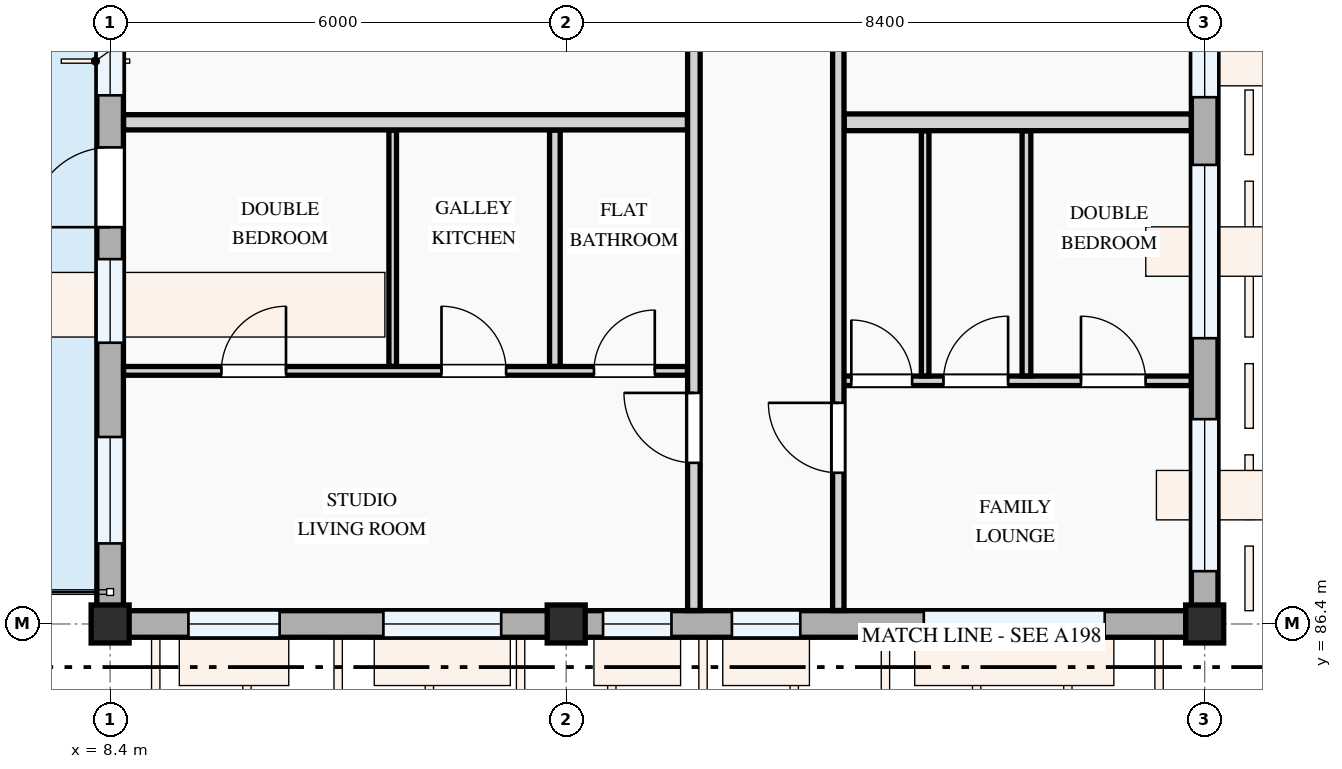
"""IFC4 building model, lengths in metres.
Left out: names, types, materials, properties, quantities, classifications, styles, units other than length and angle.
Written with IfcOpenShell. Run it as: python <this file> out.ifc"""

import sys

from ifc_helpers import new_model, si_unit, direction, frame, frame_2d, origin, origin_2d, place, context, subcontext, project, spatial, rectangle, extrude, element, fill, save


model = new_model("IFC4")
c1 = context("Model", 3, precision=1e-05, world=origin(), true_north=direction((0.0, 1.0)))
c2 = subcontext(c1, "Body", "Model", "MODEL_VIEW")
j1 = project(units=[si_unit("LENGTHUNIT", "METRE"), si_unit("PLANEANGLEUNIT", "RADIAN")], contexts=[c1])
p1 = place(None, origin())
s1 = spatial("IfcSite", under=j1, at=p1, CompositionType="ELEMENT")
p2 = place(p1, origin())
s2 = spatial("IfcBuilding", under=s1, at=p2, CompositionType="ELEMENT")
p3 = place(p2, frame((0.0, 0.0, 47.7)))
s3 = spatial("IfcBuildingStorey", under=s2, at=p3, CompositionType="ELEMENT", Elevation=47.7)
for number, where, z_axis, x_axis in (
    (1, (8.4, 86.4, 0.0), (0.0, 0.0, 1.0), (1.0, 0.0, 0.0)),
    (2, (14.4, 86.4, 0.0), (0.0, 0.0, 1.0), (1.0, 0.0, 0.0)),
    (3, (22.8, 86.4, 0.0), (0.0, 0.0, 1.0), (1.0, 0.0, 0.0)),
):
    element("IfcColumn", number, at=place(p3, frame(where, z_axis=z_axis, x_axis=x_axis)), inside=s3, PredefinedType="COLUMN", context=c2, shape_type="SweptSolid", body=[
        extrude(rectangle(XDim=0.5, YDim=0.5, at=origin_2d()), origin(), (0.0, 0.0, 1.0), 3.3),
    ])
p4 = place(p3, frame((8.4, 94.8, 0.0), z_axis=(0.0, 0.0, 1.0), x_axis=(0.0, -1.0, 0.0)))
e4 = element("IfcWall", 4, at=p4, inside=s3, PredefinedType="STANDARD", context=c2, shape_type="SweptSolid", body=[
    extrude(rectangle(XDim=8.4, YDim=0.35, at=frame_2d((4.2, 0.0))), origin(), (0.0, 0.0, 1.0), 2.425),
])
p5 = place(p4, frame((2.13, 0.0, 0.0)))
e5 = element("IfcOpeningElement", 5, at=p5, cuts=e4, PredefinedType="OPENING", context=c2, shape_type="SweptSolid", body=[
    extrude(rectangle(XDim=1.05, YDim=2.15, at=frame_2d((0.525, 1.075))), frame((0.0, 0.185, 0.0), z_axis=(0.0, -1.0, 0.0), x_axis=(1.0, 0.0, 0.0)), (0.0, 0.0, 1.0), 0.37),
])
p6 = place(p4, frame((0.545, 0.0, 0.78)))
e6 = element("IfcOpeningElement", 6, at=p6, cuts=e4, PredefinedType="OPENING", context=c2, shape_type="SweptSolid", body=[
    extrude(rectangle(XDim=0.9, YDim=1.2, at=frame_2d((0.45, 0.6))), frame((0.0, 0.185, 0.0), z_axis=(0.0, -1.0, 0.0), x_axis=(1.0, 0.0, 0.0)), (0.0, 0.0, 1.0), 0.37),
])
p7 = place(p4, frame((3.6, 0.0, 0.78)))
e7 = element("IfcOpeningElement", 7, at=p7, cuts=e4, PredefinedType="OPENING", context=c2, shape_type="SweptSolid", body=[
    extrude(rectangle(XDim=1.1, YDim=1.3, at=frame_2d((0.55, 0.65))), frame((0.0, 0.185, 0.0), z_axis=(0.0, -1.0, 0.0), x_axis=(1.0, 0.0, 0.0)), (0.0, 0.0, 1.0), 0.37),
])
p8 = place(p4, frame((5.94, 0.0, 0.78)))
e8 = element("IfcOpeningElement", 8, at=p8, cuts=e4, PredefinedType="OPENING", context=c2, shape_type="SweptSolid", body=[
    extrude(rectangle(XDim=1.4, YDim=1.45, at=frame_2d((0.7, 0.725))), frame((0.0, 0.185, 0.0), z_axis=(0.0, -1.0, 0.0), x_axis=(1.0, 0.0, 0.0)), (0.0, 0.0, 1.0), 0.37),
])
p9 = place(p3, frame((8.4, 86.4, 0.0), z_axis=(0.0, 0.0, 1.0), x_axis=(1.0, 0.0, 0.0)))
e9 = element("IfcWall", 9, at=p9, inside=s3, PredefinedType="STANDARD", context=c2, shape_type="SweptSolid", body=[
    extrude(rectangle(XDim=6.0, YDim=0.35, at=frame_2d((3.0, 0.0))), origin(), (0.0, 0.0, 1.0), 2.525),
])
p10 = place(p9, frame((1.03, 0.0, 0.78)))
e10 = element("IfcOpeningElement", 10, at=p10, cuts=e9, PredefinedType="OPENING", context=c2, shape_type="SweptSolid", body=[
    extrude(rectangle(XDim=1.2, YDim=1.35, at=frame_2d((0.6, 0.675))), frame((0.0, 0.185, 0.0), z_axis=(0.0, -1.0, 0.0), x_axis=(1.0, 0.0, 0.0)), (0.0, 0.0, 1.0), 0.37),
])
p11 = place(p9, frame((3.595, 0.0, 0.78)))
e11 = element("IfcOpeningElement", 11, at=p11, cuts=e9, PredefinedType="OPENING", context=c2, shape_type="SweptSolid", body=[
    extrude(rectangle(XDim=1.55, YDim=1.4, at=frame_2d((0.775, 0.7))), frame((0.0, 0.185, 0.0), z_axis=(0.0, -1.0, 0.0), x_axis=(1.0, 0.0, 0.0)), (0.0, 0.0, 1.0), 0.37),
])
p12 = place(p3, frame((14.4, 86.4, 0.0), z_axis=(0.0, 0.0, 1.0), x_axis=(1.0, 0.0, 0.0)))
e12 = element("IfcWall", 12, at=p12, inside=s3, PredefinedType="STANDARD", context=c2, shape_type="SweptSolid", body=[
    extrude(rectangle(XDim=8.4, YDim=0.35, at=frame_2d((4.2, 0.0))), origin(), (0.0, 0.0, 1.0), 2.375),
])
p13 = place(p12, frame((0.485, 0.0, 0.78)))
e13 = element("IfcOpeningElement", 13, at=p13, cuts=e12, PredefinedType="OPENING", context=c2, shape_type="SweptSolid", body=[
    extrude(rectangle(XDim=0.9, YDim=1.2, at=frame_2d((0.45, 0.6))), frame((0.0, 0.185, 0.0), z_axis=(0.0, -1.0, 0.0), x_axis=(1.0, 0.0, 0.0)), (0.0, 0.0, 1.0), 0.37),
])
p14 = place(p12, frame((2.18, 0.0, 0.78)))
e14 = element("IfcOpeningElement", 14, at=p14, cuts=e12, PredefinedType="OPENING", context=c2, shape_type="SweptSolid", body=[
    extrude(rectangle(XDim=0.9, YDim=1.2, at=frame_2d((0.45, 0.6))), frame((0.0, 0.185, 0.0), z_axis=(0.0, -1.0, 0.0), x_axis=(1.0, 0.0, 0.0)), (0.0, 0.0, 1.0), 0.37),
])
p15 = place(p12, frame((4.705, 0.0, 0.78)))
e15 = element("IfcOpeningElement", 15, at=p15, cuts=e12, PredefinedType="OPENING", context=c2, shape_type="SweptSolid", body=[
    extrude(rectangle(XDim=2.38, YDim=1.48, at=frame_2d((1.19, 0.74))), frame((0.0, 0.185, 0.0), z_axis=(0.0, -1.0, 0.0), x_axis=(1.0, 0.0, 0.0)), (0.0, 0.0, 1.0), 0.37),
])
p16 = place(p3, frame((22.8, 86.4, 0.0), z_axis=(0.0, 0.0, 1.0), x_axis=(0.0, 1.0, 0.0)))
e16 = element("IfcWall", 16, at=p16, inside=s3, PredefinedType="STANDARD", context=c2, shape_type="SweptSolid", body=[
    extrude(rectangle(XDim=8.4, YDim=0.35, at=frame_2d((4.2, 0.0))), origin(), (0.0, 0.0, 1.0), 2.425),
])
p17 = place(p16, frame((0.695, 0.0, 0.78)))
e17 = element("IfcOpeningElement", 17, at=p17, cuts=e16, PredefinedType="OPENING", context=c2, shape_type="SweptSolid", body=[
    extrude(rectangle(XDim=2.0, YDim=1.5, at=frame_2d((1.0, 0.75))), frame((0.0, 0.185, 0.0), z_axis=(0.0, -1.0, 0.0), x_axis=(1.0, 0.0, 0.0)), (0.0, 0.0, 1.0), 0.37),
])
p18 = place(p16, frame((3.76, 0.0, 0.78)))
e18 = element("IfcOpeningElement", 18, at=p18, cuts=e16, PredefinedType="OPENING", context=c2, shape_type="SweptSolid", body=[
    extrude(rectangle(XDim=2.28, YDim=1.46, at=frame_2d((1.14, 0.73))), frame((0.0, 0.185, 0.0), z_axis=(0.0, -1.0, 0.0), x_axis=(1.0, 0.0, 0.0)), (0.0, 0.0, 1.0), 0.37),
])
p19 = place(p16, frame((6.93, 0.0, 0.78)))
e19 = element("IfcOpeningElement", 19, at=p19, cuts=e16, PredefinedType="OPENING", context=c2, shape_type="SweptSolid", body=[
    extrude(rectangle(XDim=0.95, YDim=1.15, at=frame_2d((0.475, 0.575))), frame((0.0, 0.185, 0.0), z_axis=(0.0, -1.0, 0.0), x_axis=(1.0, 0.0, 0.0)), (0.0, 0.0, 1.0), 0.37),
])
p20 = place(p3, frame((8.577, 89.73, 0.0), z_axis=(0.0, 0.0, 1.0), x_axis=(1.0, 0.0, 0.0)))
e20 = element("IfcWall", 20, at=p20, inside=s3, PredefinedType="PARTITIONING", context=c2, shape_type="SweptSolid", body=[
    extrude(rectangle(XDim=7.419, YDim=0.115, at=frame_2d((3.709, 0.0))), origin(), (0.0, 0.0, 1.0), 3.0),
])
p21 = place(p20, frame((1.287, 0.0, 0.0)))
e21 = element("IfcOpeningElement", 21, at=p21, cuts=e20, PredefinedType="OPENING", context=c2, shape_type="SweptSolid", body=[
    extrude(rectangle(XDim=0.85, YDim=2.1, at=frame_2d((0.425, 1.05))), frame((0.0, 0.067, 0.0), z_axis=(0.0, -1.0, 0.0), x_axis=(1.0, 0.0, 0.0)), (0.0, 0.0, 1.0), 0.135),
])
p22 = place(p20, frame((4.182, 0.0, 0.0)))
e22 = element("IfcOpeningElement", 22, at=p22, cuts=e20, PredefinedType="OPENING", context=c2, shape_type="SweptSolid", body=[
    extrude(rectangle(XDim=0.85, YDim=2.1, at=frame_2d((0.425, 1.05))), frame((0.0, 0.067, 0.0), z_axis=(0.0, -1.0, 0.0), x_axis=(1.0, 0.0, 0.0)), (0.0, 0.0, 1.0), 0.135),
])
p23 = place(p20, frame((6.189, 0.0, 0.0)))
e23 = element("IfcOpeningElement", 23, at=p23, cuts=e20, PredefinedType="OPENING", context=c2, shape_type="SweptSolid", body=[
    extrude(rectangle(XDim=0.8, YDim=2.1, at=frame_2d((0.4, 1.05))), frame((0.0, 0.067, 0.0), z_axis=(0.0, -1.0, 0.0), x_axis=(1.0, 0.0, 0.0)), (0.0, 0.0, 1.0), 0.135),
])
p24 = place(p3, frame((12.118, 89.79, 0.0), z_axis=(0.0, 0.0, 1.0), x_axis=(0.0, 1.0, 0.0)))
e24 = element("IfcWall", 24, at=p24, inside=s3, PredefinedType="PARTITIONING", context=c2, shape_type="SweptSolid", body=[
    extrude(rectangle(XDim=3.108, YDim=0.1, at=frame_2d((1.554, 0.0))), origin(), (0.0, 0.0, 1.0), 3.0),
])
p25 = place(p3, frame((14.251, 89.79, 0.0), z_axis=(0.0, 0.0, 1.0), x_axis=(0.0, 1.0, 0.0)))
e25 = element("IfcWall", 25, at=p25, inside=s3, PredefinedType="PARTITIONING", context=c2, shape_type="SweptSolid", body=[
    extrude(rectangle(XDim=3.108, YDim=0.14, at=frame_2d((1.554, 0.0))), origin(), (0.0, 0.0, 1.0), 2.425),
])
p26 = place(p3, frame((17.98, 89.599, 0.0), z_axis=(0.0, 0.0, 1.0), x_axis=(1.0, 0.0, 0.0)))
e26 = element("IfcWall", 26, at=p26, inside=s3, PredefinedType="PARTITIONING", context=c2, shape_type="SweptSolid", body=[
    extrude(rectangle(XDim=4.643, YDim=0.125, at=frame_2d((2.322, 0.0))), origin(), (0.0, 0.0, 1.0), 3.0),
])
p27 = place(p26, frame((0.171, 0.0, 0.0)))
e27 = element("IfcOpeningElement", 27, at=p27, cuts=e26, PredefinedType="OPENING", context=c2, shape_type="SweptSolid", body=[
    extrude(rectangle(XDim=0.8, YDim=2.1, at=frame_2d((0.4, 1.05))), frame((0.0, 0.073, 0.0), z_axis=(0.0, -1.0, 0.0), x_axis=(1.0, 0.0, 0.0)), (0.0, 0.0, 1.0), 0.145),
])
p28 = place(p26, frame((1.384, 0.0, 0.0)))
e28 = element("IfcOpeningElement", 28, at=p28, cuts=e26, PredefinedType="OPENING", context=c2, shape_type="SweptSolid", body=[
    extrude(rectangle(XDim=0.85, YDim=2.1, at=frame_2d((0.425, 1.05))), frame((0.0, 0.073, 0.0), z_axis=(0.0, -1.0, 0.0), x_axis=(1.0, 0.0, 0.0)), (0.0, 0.0, 1.0), 0.145),
])
p29 = place(p26, frame((3.193, 0.0, 0.0)))
e29 = element("IfcOpeningElement", 29, at=p29, cuts=e26, PredefinedType="OPENING", context=c2, shape_type="SweptSolid", body=[
    extrude(rectangle(XDim=0.85, YDim=2.1, at=frame_2d((0.425, 1.05))), frame((0.0, 0.073, 0.0), z_axis=(0.0, -1.0, 0.0), x_axis=(1.0, 0.0, 0.0)), (0.0, 0.0, 1.0), 0.145),
])
p30 = place(p3, frame((20.455, 89.664, 0.0), z_axis=(0.0, 0.0, 1.0), x_axis=(0.0, 1.0, 0.0)))
e30 = element("IfcWall", 30, at=p30, inside=s3, PredefinedType="PARTITIONING", context=c2, shape_type="SweptSolid", body=[
    extrude(rectangle(XDim=3.224, YDim=0.115, at=frame_2d((1.612, 0.0))), origin(), (0.0, 0.0, 1.0), 3.0),
])
p31 = place(p3, frame((19.122, 89.664, 0.0), z_axis=(0.0, 0.0, 1.0), x_axis=(0.0, 1.0, 0.0)))
e31 = element("IfcWall", 31, at=p31, inside=s3, PredefinedType="PARTITIONING", context=c2, shape_type="SweptSolid", body=[
    extrude(rectangle(XDim=3.224, YDim=0.1, at=frame_2d((1.612, 0.0))), origin(), (0.0, 0.0, 1.0), 3.0),
])
p32 = place(p3, frame((8.577, 93.0, 0.0), z_axis=(0.0, 0.0, 1.0), x_axis=(1.0, 0.0, 0.0)))
e32 = element("IfcWall", 32, at=p32, inside=s3, PredefinedType="PARTITIONING", context=c2, shape_type="SweptSolid", body=[
    extrude(rectangle(XDim=7.419, YDim=0.2, at=frame_2d((3.709, 0.0))), origin(), (0.0, 0.0, 1.0), 3.0),
])
p33 = place(p3, frame((18.057, 93.0, 0.0), z_axis=(0.0, 0.0, 1.0), x_axis=(1.0, 0.0, 0.0)))
e33 = element("IfcWall", 33, at=p33, inside=s3, PredefinedType="PARTITIONING", context=c2, shape_type="SweptSolid", body=[
    extrude(rectangle(XDim=4.566, YDim=0.22, at=frame_2d((2.283, 0.0))), origin(), (0.0, 0.0, 1.0), 3.0),
])
p34 = place(p3, frame((16.08, 86.577, 0.0), z_axis=(0.0, 0.0, 1.0), x_axis=(0.0, 1.0, 0.0)))
e34 = element("IfcWall", 34, at=p34, inside=s3, PredefinedType="PARTITIONING", context=c2, shape_type="SweptSolid", body=[
    extrude(rectangle(XDim=22.763, YDim=0.165, at=frame_2d((11.382, 0.0))), origin(), (0.0, 0.0, 1.0), 3.0),
])
p35 = place(p34, frame((1.943, 0.0, 0.0)))
e35 = element("IfcOpeningElement", 35, at=p35, cuts=e34, PredefinedType="OPENING", context=c2, shape_type="SweptSolid", body=[
    extrude(rectangle(XDim=0.92, YDim=2.1, at=frame_2d((0.46, 1.05))), frame((0.0, 0.093, 0.0), z_axis=(0.0, -1.0, 0.0), x_axis=(1.0, 0.0, 0.0)), (0.0, 0.0, 1.0), 0.185),
])
p36 = place(p34, frame((10.728, 0.0, 0.0)))
e36 = element("IfcOpeningElement", 36, at=p36, cuts=e34, PredefinedType="OPENING", context=c2, shape_type="SweptSolid", body=[
    extrude(rectangle(XDim=0.96, YDim=2.12, at=frame_2d((0.48, 1.06))), frame((0.0, 0.093, 0.0), z_axis=(0.0, -1.0, 0.0), x_axis=(1.0, 0.0, 0.0)), (0.0, 0.0, 1.0), 0.185),
])
p37 = place(p3, frame((17.98, 86.577, 0.0), z_axis=(0.0, 0.0, 1.0), x_axis=(0.0, 1.0, 0.0)))
e37 = element("IfcWall", 37, at=p37, inside=s3, PredefinedType="PARTITIONING", context=c2, shape_type="SweptSolid", body=[
    extrude(rectangle(XDim=22.763, YDim=0.15, at=frame_2d((11.382, 0.0))), origin(), (0.0, 0.0, 1.0), 3.0),
])
p38 = place(p37, frame((1.812, 0.0, 0.0)))
e38 = element("IfcOpeningElement", 38, at=p38, cuts=e37, PredefinedType="OPENING", context=c2, shape_type="SweptSolid", body=[
    extrude(rectangle(XDim=0.92, YDim=2.1, at=frame_2d((0.46, 1.05))), frame((0.0, 0.085, 0.0), z_axis=(0.0, -1.0, 0.0), x_axis=(1.0, 0.0, 0.0)), (0.0, 0.0, 1.0), 0.17),
])
p39 = place(p37, frame((10.715, 0.0, 0.0)))
e39 = element("IfcOpeningElement", 39, at=p39, cuts=e37, PredefinedType="OPENING", context=c2, shape_type="SweptSolid", body=[
    extrude(rectangle(XDim=0.92, YDim=2.1, at=frame_2d((0.46, 1.05))), frame((0.0, 0.085, 0.0), z_axis=(0.0, -1.0, 0.0), x_axis=(1.0, 0.0, 0.0)), (0.0, 0.0, 1.0), 0.17),
])
p40 = place(p5, frame((1.05, 0.0, 0.0), z_axis=(0.0, 0.0, 1.0), x_axis=(-1.0, 0.0, 0.0)))
e40 = element("IfcDoor", 40, at=p40, inside=s3, OperationType="SINGLE_SWING_LEFT", PredefinedType="DOOR", context=c2, shape_type="SweptSolid", body=[
    extrude(rectangle(XDim=1.05, YDim=2.15, at=frame_2d((0.525, 1.075))), frame((0.0, 0.025, 0.0), z_axis=(0.0, -1.0, 0.0), x_axis=(1.0, 0.0, 0.0)), (0.0, 0.0, 1.0), 0.05),
])
fill(e5, e40)
p41 = place(p6, origin())
e41 = element("IfcWindow", 41, at=p41, inside=s3, PartitioningType="SINGLE_PANEL", PredefinedType="WINDOW", context=c2, shape_type="SweptSolid", body=[
    extrude(rectangle(XDim=0.9, YDim=1.2, at=frame_2d((0.45, 0.6))), frame((0.0, 0.03, 0.0), z_axis=(0.0, -1.0, 0.0), x_axis=(1.0, 0.0, 0.0)), (0.0, 0.0, 1.0), 0.06),
])
fill(e6, e41)
p42 = place(p7, origin())
e42 = element("IfcWindow", 42, at=p42, inside=s3, PartitioningType="SINGLE_PANEL", PredefinedType="WINDOW", context=c2, shape_type="SweptSolid", body=[
    extrude(rectangle(XDim=1.1, YDim=1.3, at=frame_2d((0.55, 0.65))), frame((0.0, 0.03, 0.0), z_axis=(0.0, -1.0, 0.0), x_axis=(1.0, 0.0, 0.0)), (0.0, 0.0, 1.0), 0.06),
])
fill(e7, e42)
p43 = place(p8, origin())
e43 = element("IfcWindow", 43, at=p43, inside=s3, PartitioningType="SINGLE_PANEL", PredefinedType="WINDOW", context=c2, shape_type="SweptSolid", body=[
    extrude(rectangle(XDim=1.4, YDim=1.45, at=frame_2d((0.7, 0.725))), frame((0.0, 0.03, 0.0), z_axis=(0.0, -1.0, 0.0), x_axis=(1.0, 0.0, 0.0)), (0.0, 0.0, 1.0), 0.06),
])
fill(e8, e43)
p44 = place(p10, origin())
e44 = element("IfcWindow", 44, at=p44, inside=s3, PartitioningType="SINGLE_PANEL", PredefinedType="WINDOW", context=c2, shape_type="SweptSolid", body=[
    extrude(rectangle(XDim=1.2, YDim=1.35, at=frame_2d((0.6, 0.675))), frame((0.0, 0.03, 0.0), z_axis=(0.0, -1.0, 0.0), x_axis=(1.0, 0.0, 0.0)), (0.0, 0.0, 1.0), 0.06),
])
fill(e10, e44)
p45 = place(p11, origin())
e45 = element("IfcWindow", 45, at=p45, inside=s3, PartitioningType="SINGLE_PANEL", PredefinedType="WINDOW", context=c2, shape_type="SweptSolid", body=[
    extrude(rectangle(XDim=1.55, YDim=1.4, at=frame_2d((0.775, 0.7))), frame((0.0, 0.03, 0.0), z_axis=(0.0, -1.0, 0.0), x_axis=(1.0, 0.0, 0.0)), (0.0, 0.0, 1.0), 0.06),
])
fill(e11, e45)
p46 = place(p13, origin())
e46 = element("IfcWindow", 46, at=p46, inside=s3, PartitioningType="SINGLE_PANEL", PredefinedType="WINDOW", context=c2, shape_type="SweptSolid", body=[
    extrude(rectangle(XDim=0.9, YDim=1.2, at=frame_2d((0.45, 0.6))), frame((0.0, 0.03, 0.0), z_axis=(0.0, -1.0, 0.0), x_axis=(1.0, 0.0, 0.0)), (0.0, 0.0, 1.0), 0.06),
])
fill(e13, e46)
p47 = place(p14, origin())
e47 = element("IfcWindow", 47, at=p47, inside=s3, PartitioningType="SINGLE_PANEL", PredefinedType="WINDOW", context=c2, shape_type="SweptSolid", body=[
    extrude(rectangle(XDim=0.9, YDim=1.2, at=frame_2d((0.45, 0.6))), frame((0.0, 0.03, 0.0), z_axis=(0.0, -1.0, 0.0), x_axis=(1.0, 0.0, 0.0)), (0.0, 0.0, 1.0), 0.06),
])
fill(e14, e47)
p48 = place(p15, origin())
e48 = element("IfcWindow", 48, at=p48, inside=s3, PartitioningType="DOUBLE_PANEL_VERTICAL", PredefinedType="WINDOW", context=c2, shape_type="SweptSolid", body=[
    extrude(rectangle(XDim=2.38, YDim=1.48, at=frame_2d((1.19, 0.74))), frame((0.0, 0.03, 0.0), z_axis=(0.0, -1.0, 0.0), x_axis=(1.0, 0.0, 0.0)), (0.0, 0.0, 1.0), 0.06),
])
fill(e15, e48)
p49 = place(p17, origin())
e49 = element("IfcWindow", 49, at=p49, inside=s3, PartitioningType="DOUBLE_PANEL_VERTICAL", PredefinedType="WINDOW", context=c2, shape_type="SweptSolid", body=[
    extrude(rectangle(XDim=2.0, YDim=1.5, at=frame_2d((1.0, 0.75))), frame((0.0, 0.03, 0.0), z_axis=(0.0, -1.0, 0.0), x_axis=(1.0, 0.0, 0.0)), (0.0, 0.0, 1.0), 0.06),
])
fill(e17, e49)
p50 = place(p18, origin())
e50 = element("IfcWindow", 50, at=p50, inside=s3, PartitioningType="DOUBLE_PANEL_VERTICAL", PredefinedType="WINDOW", context=c2, shape_type="SweptSolid", body=[
    extrude(rectangle(XDim=2.28, YDim=1.46, at=frame_2d((1.14, 0.73))), frame((0.0, 0.03, 0.0), z_axis=(0.0, -1.0, 0.0), x_axis=(1.0, 0.0, 0.0)), (0.0, 0.0, 1.0), 0.06),
])
fill(e18, e50)
p51 = place(p19, origin())
e51 = element("IfcWindow", 51, at=p51, inside=s3, PartitioningType="SINGLE_PANEL", PredefinedType="WINDOW", context=c2, shape_type="SweptSolid", body=[
    extrude(rectangle(XDim=0.95, YDim=1.15, at=frame_2d((0.475, 0.575))), frame((0.0, 0.03, 0.0), z_axis=(0.0, -1.0, 0.0), x_axis=(1.0, 0.0, 0.0)), (0.0, 0.0, 1.0), 0.06),
])
fill(e19, e51)
p52 = place(p21, origin())
e52 = element("IfcDoor", 52, at=p52, inside=s3, OperationType="SINGLE_SWING_RIGHT", PredefinedType="DOOR", context=c2, shape_type="SweptSolid", body=[
    extrude(rectangle(XDim=0.85, YDim=2.1, at=frame_2d((0.425, 1.05))), frame((0.0, 0.025, 0.0), z_axis=(0.0, -1.0, 0.0), x_axis=(1.0, 0.0, 0.0)), (0.0, 0.0, 1.0), 0.05),
])
fill(e21, e52)
p53 = place(p22, origin())
e53 = element("IfcDoor", 53, at=p53, inside=s3, OperationType="SINGLE_SWING_LEFT", PredefinedType="DOOR", context=c2, shape_type="SweptSolid", body=[
    extrude(rectangle(XDim=0.85, YDim=2.1, at=frame_2d((0.425, 1.05))), frame((0.0, 0.025, 0.0), z_axis=(0.0, -1.0, 0.0), x_axis=(1.0, 0.0, 0.0)), (0.0, 0.0, 1.0), 0.05),
])
fill(e22, e53)
p54 = place(p23, origin())
e54 = element("IfcDoor", 54, at=p54, inside=s3, OperationType="SINGLE_SWING_RIGHT", PredefinedType="DOOR", context=c2, shape_type="SweptSolid", body=[
    extrude(rectangle(XDim=0.8, YDim=2.1, at=frame_2d((0.4, 1.05))), frame((0.0, 0.025, 0.0), z_axis=(0.0, -1.0, 0.0), x_axis=(1.0, 0.0, 0.0)), (0.0, 0.0, 1.0), 0.05),
])
fill(e23, e54)
p55 = place(p27, origin())
e55 = element("IfcDoor", 55, at=p55, inside=s3, OperationType="SINGLE_SWING_LEFT", PredefinedType="DOOR", context=c2, shape_type="SweptSolid", body=[
    extrude(rectangle(XDim=0.8, YDim=2.1, at=frame_2d((0.4, 1.05))), frame((0.0, 0.025, 0.0), z_axis=(0.0, -1.0, 0.0), x_axis=(1.0, 0.0, 0.0)), (0.0, 0.0, 1.0), 0.05),
])
fill(e27, e55)
p56 = place(p28, origin())
e56 = element("IfcDoor", 56, at=p56, inside=s3, OperationType="SINGLE_SWING_RIGHT", PredefinedType="DOOR", context=c2, shape_type="SweptSolid", body=[
    extrude(rectangle(XDim=0.85, YDim=2.1, at=frame_2d((0.425, 1.05))), frame((0.0, 0.025, 0.0), z_axis=(0.0, -1.0, 0.0), x_axis=(1.0, 0.0, 0.0)), (0.0, 0.0, 1.0), 0.05),
])
fill(e28, e56)
p57 = place(p29, origin())
e57 = element("IfcDoor", 57, at=p57, inside=s3, OperationType="SINGLE_SWING_LEFT", PredefinedType="DOOR", context=c2, shape_type="SweptSolid", body=[
    extrude(rectangle(XDim=0.85, YDim=2.1, at=frame_2d((0.425, 1.05))), frame((0.0, 0.025, 0.0), z_axis=(0.0, -1.0, 0.0), x_axis=(1.0, 0.0, 0.0)), (0.0, 0.0, 1.0), 0.05),
])
fill(e29, e57)
p58 = place(p35, origin())
e58 = element("IfcDoor", 58, at=p58, inside=s3, OperationType="SINGLE_SWING_RIGHT", PredefinedType="DOOR", context=c2, shape_type="SweptSolid", body=[
    extrude(rectangle(XDim=0.92, YDim=2.1, at=frame_2d((0.46, 1.05))), frame((0.0, 0.025, 0.0), z_axis=(0.0, -1.0, 0.0), x_axis=(1.0, 0.0, 0.0)), (0.0, 0.0, 1.0), 0.05),
])
fill(e35, e58)
p59 = place(p38, origin())
e59 = element("IfcDoor", 59, at=p59, inside=s3, OperationType="SINGLE_SWING_RIGHT", PredefinedType="DOOR", context=c2, shape_type="SweptSolid", body=[
    extrude(rectangle(XDim=0.92, YDim=2.1, at=frame_2d((0.46, 1.05))), frame((0.0, 0.025, 0.0), z_axis=(0.0, -1.0, 0.0), x_axis=(1.0, 0.0, 0.0)), (0.0, 0.0, 1.0), 0.05),
])
fill(e38, e59)
save(model, sys.argv[1])
